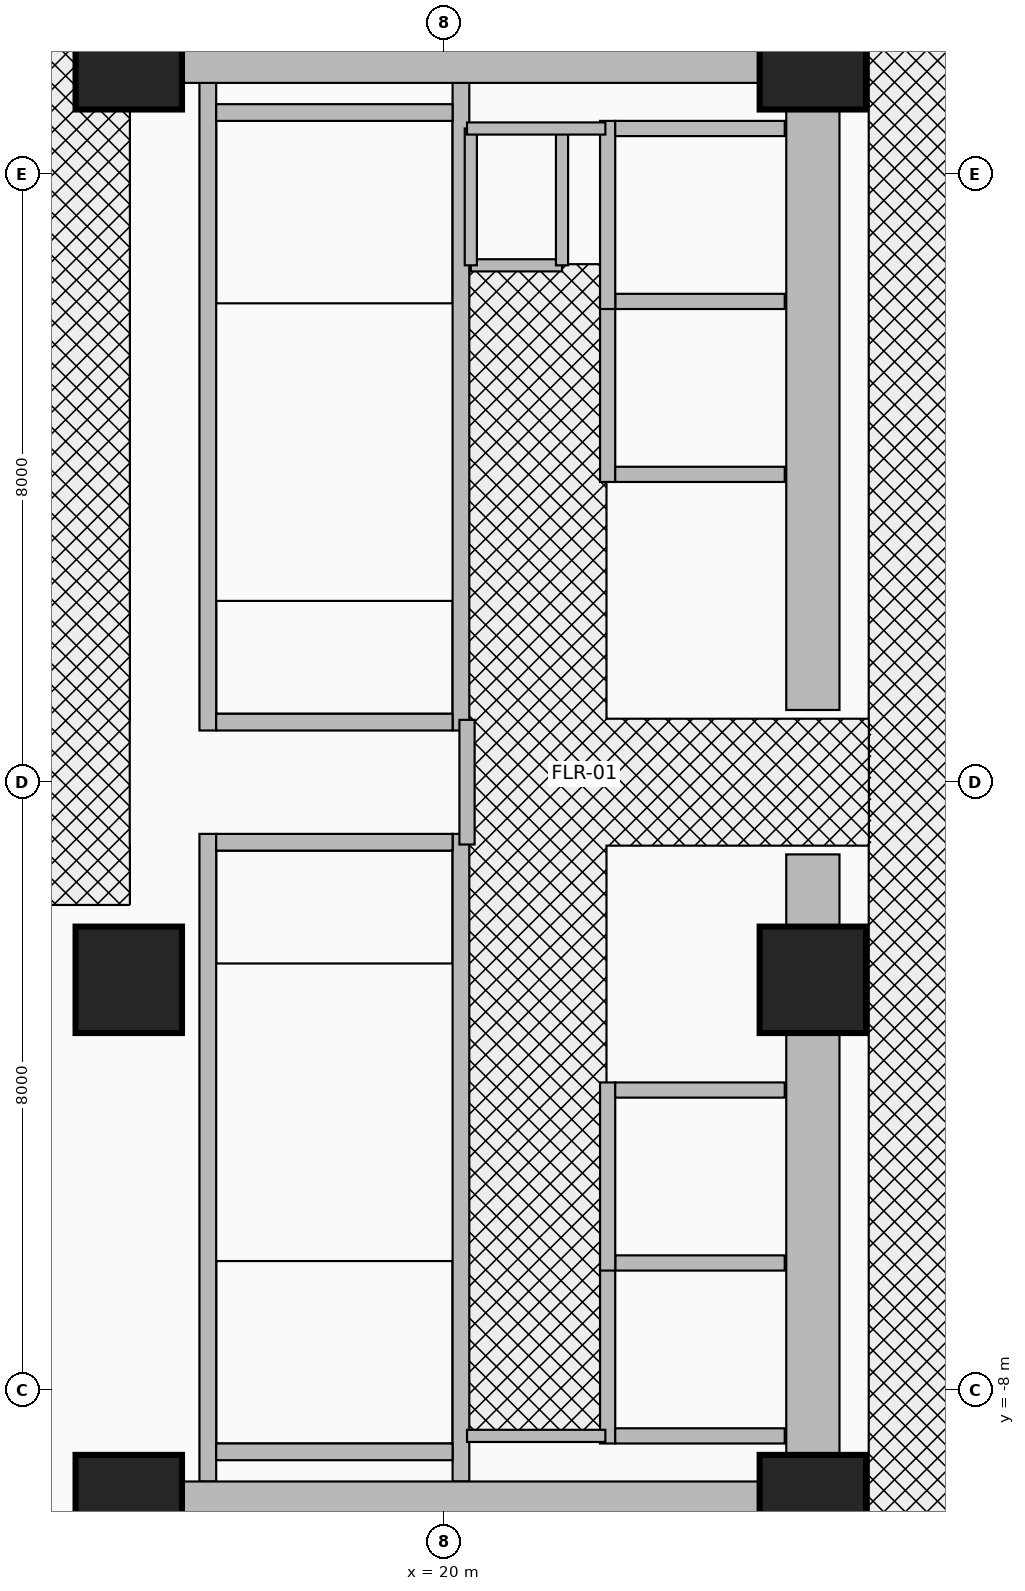
"""IFC4 building model, lengths in metres.
Left out: names, types, materials, properties, quantities, classifications, styles, units other than length and angle.
Written with IfcOpenShell. Run it as: python <this file> out.ifc"""

import sys

from ifc_helpers import new_model, si_unit, direction, frame, frame_2d, origin, origin_2d, place, context, subcontext, project, spatial, rectangle, extrude, source, transform, mapped, element, fill, save


model = new_model("IFC4")
c1 = context("Model", 3, precision=1e-05, world=origin(), true_north=direction((0.0, 1.0)))
c2 = subcontext(c1, "Body", "Model", "MODEL_VIEW")
j1 = project(units=[si_unit("LENGTHUNIT", "METRE"), si_unit("PLANEANGLEUNIT", "RADIAN")], contexts=[c1])
p1 = place(None, origin())
s1 = spatial("IfcSite", under=j1, at=p1, CompositionType="ELEMENT")
p2 = place(p1, origin())
s2 = spatial("IfcBuilding", under=s1, at=p2, CompositionType="ELEMENT")
p3 = place(p2, frame((0.0, 0.0, 10.4)))
s3 = spatial("IfcBuildingStorey", under=s2, at=p3, CompositionType="ELEMENT", Elevation=10.4)
for number, where, z_axis, x_axis in (
    (1, (16.89, 0.68, 0.0), (0.0, 0.0, 1.0), (0.0, 1.0, 0.0)),
    (2, (20.22, 0.68, 0.0), (0.0, 0.0, 1.0), (0.0, 1.0, 0.0)),
):
    element("IfcWall", number, at=place(p3, frame(where, z_axis=z_axis, x_axis=x_axis)), inside=s3, PredefinedType="SHEAR", context=c2, shape_type="SweptSolid", body=[
        extrude(rectangle(XDim=8.52, YDim=0.22, at=frame_2d((4.26, 0.0))), origin(), (0.0, 0.0, 1.0), 4.92),
    ])
p4 = place(p3, frame((17.0, 0.79, 0.0), z_axis=(0.0, 0.0, 1.0), x_axis=(1.0, 0.0, 0.0)))
e3 = element("IfcWall", 3, at=p4, inside=s3, PredefinedType="SHEAR", context=c2, shape_type="SweptSolid", body=[
    extrude(rectangle(XDim=3.11, YDim=0.22, at=frame_2d((1.555, 0.0))), origin(), (0.0, 0.0, 1.0), 4.92),
])
p5 = place(p4, frame((0.95, 0.0, 0.0)))
e4 = element("IfcOpeningElement", 4, at=p5, cuts=e3, PredefinedType="OPENING", context=c2, shape_type="SweptSolid", body=[
    extrude(rectangle(XDim=1.1, YDim=2.15, at=frame_2d((0.55, 1.075))), frame((0.0, 0.125, 0.0), z_axis=(0.0, -1.0, 0.0), x_axis=(1.0, 0.0, 0.0)), (0.0, 0.0, 1.0), 0.25),
])
p6 = place(p3, frame((17.0, 8.81, 0.0), z_axis=(0.0, 0.0, 1.0), x_axis=(1.0, 0.0, 0.0)))
e5 = element("IfcWall", 5, at=p6, inside=s3, PredefinedType="SHEAR", context=c2, shape_type="SweptSolid", body=[
    extrude(rectangle(XDim=3.11, YDim=0.22, at=frame_2d((1.555, 0.0))), origin(), (0.0, 0.0, 1.0), 4.92),
])
for number, where, z_axis, x_axis in (
    (6, (16.89, -9.2, 0.0), (0.0, 0.0, 1.0), (0.0, 1.0, 0.0)),
    (7, (20.22, -9.2, 0.0), (0.0, 0.0, 1.0), (0.0, 1.0, 0.0)),
):
    element("IfcWall", number, at=place(p3, frame(where, z_axis=z_axis, x_axis=x_axis)), inside=s3, PredefinedType="SHEAR", context=c2, shape_type="SweptSolid", body=[
        extrude(rectangle(XDim=8.52, YDim=0.22, at=frame_2d((4.26, 0.0))), origin(), (0.0, 0.0, 1.0), 4.92),
    ])
p7 = place(p3, frame((17.0, -8.81, 0.0), z_axis=(0.0, 0.0, 1.0), x_axis=(1.0, 0.0, 0.0)))
e8 = element("IfcWall", 8, at=p7, inside=s3, PredefinedType="SHEAR", context=c2, shape_type="SweptSolid", body=[
    extrude(rectangle(XDim=3.11, YDim=0.22, at=frame_2d((1.555, 0.0))), origin(), (0.0, 0.0, 1.0), 4.92),
])
p8 = place(p3, frame((17.0, -0.79, 0.0), z_axis=(0.0, 0.0, 1.0), x_axis=(1.0, 0.0, 0.0)))
e9 = element("IfcWall", 9, at=p8, inside=s3, PredefinedType="SHEAR", context=c2, shape_type="SweptSolid", body=[
    extrude(rectangle(XDim=3.11, YDim=0.22, at=frame_2d((1.555, 0.0))), origin(), (0.0, 0.0, 1.0), 4.92),
])
p9 = place(p8, frame((0.95, 0.0, 0.0)))
e10 = element("IfcOpeningElement", 10, at=p9, cuts=e9, PredefinedType="OPENING", context=c2, shape_type="SweptSolid", body=[
    extrude(rectangle(XDim=1.1, YDim=2.15, at=frame_2d((0.55, 1.075))), frame((0.0, 0.125, 0.0), z_axis=(0.0, -1.0, 0.0), x_axis=(1.0, 0.0, 0.0)), (0.0, 0.0, 1.0), 0.25),
])
for number, where, z_axis, x_axis in (
    (11, (24.85, -9.9, 0.0), (0.0, 0.0, 1.0), (0.0, 1.0, 0.0)),
    (12, (24.85, 0.95, 0.0), (0.0, 0.0, 1.0), (0.0, 1.0, 0.0)),
):
    element("IfcWall", number, at=place(p3, frame(where, z_axis=z_axis, x_axis=x_axis)), inside=s3, PredefinedType="SHEAR", context=c2, shape_type="SweptSolid", body=[
        extrude(rectangle(XDim=8.95, YDim=0.7, at=frame_2d((4.475, 0.0))), origin(), (0.0, 0.0, 1.0), 4.92),
    ])
for number, where, z_axis, x_axis in (
    (13, (15.85, 9.55, 0.0), (0.0, 0.0, 1.0), (1.0, 0.0, 0.0)),
    (14, (15.85, -9.55, 0.0), (0.0, 0.0, 1.0), (1.0, 0.0, 0.0)),
):
    element("IfcWall", number, at=place(p3, frame(where, z_axis=z_axis, x_axis=x_axis)), inside=s3, PredefinedType="SHEAR", context=c2, shape_type="SweptSolid", body=[
        extrude(rectangle(XDim=9.0, YDim=0.7, at=frame_2d((4.5, 0.0))), origin(), (0.0, 0.0, 1.0), 4.92),
    ])
m1 = source(origin(), c2, "Body", "SweptSolid", [
    extrude(rectangle(XDim=1.4, YDim=1.4, at=origin_2d()), origin(), (0.0, 0.0, 1.0), 5.2),
])
for number, where, z_axis, x_axis in (
    (15, (15.85, -9.55, 0.0), (0.0, 0.0, 1.0), (1.0, 0.0, 0.0)),
    (16, (24.85, -9.55, 0.0), (0.0, 0.0, 1.0), (1.0, 0.0, 0.0)),
    (17, (15.85, -2.6, 0.0), (0.0, 0.0, 1.0), (1.0, 0.0, 0.0)),
    (18, (24.85, -2.6, 0.0), (0.0, 0.0, 1.0), (1.0, 0.0, 0.0)),
    (19, (15.85, 9.55, 0.0), (0.0, 0.0, 1.0), (1.0, 0.0, 0.0)),
    (20, (24.85, 9.55, 0.0), (0.0, 0.0, 1.0), (1.0, 0.0, 0.0)),
):
    element("IfcColumn", number, at=place(p3, frame(where, z_axis=z_axis, x_axis=x_axis)), inside=s3, PredefinedType="COLUMN", context=c2, shape_type="MappedRepresentation", body=[
        mapped(m1, transform((0.0, 0.0, 0.0), x_axis=(1.0, 0.0, 0.0), y_axis=(0.0, 1.0, 0.0), z_axis=(0.0, 0.0, 1.0), scale=1.0)),
    ])
p10 = place(p3, frame((22.15, -8.7, 0.0), z_axis=(0.0, 0.0, 1.0), x_axis=(0.0, 1.0, 0.0)))
e21 = element("IfcWall", 21, at=p10, inside=s3, PredefinedType="MOVABLE", context=c2, shape_type="SweptSolid", body=[
    extrude(rectangle(XDim=2.475, YDim=0.2, at=frame_2d((1.237, 0.0))), origin(), (0.0, 0.0, 1.0), 4.92),
])
p11 = place(p10, frame((0.688, 0.0, 0.0)))
e22 = element("IfcOpeningElement", 22, at=p11, cuts=e21, PredefinedType="OPENING", context=c2, shape_type="SweptSolid", body=[
    extrude(rectangle(XDim=1.1, YDim=2.1, at=frame_2d((0.55, 1.05))), frame((0.0, 0.115, 0.0), z_axis=(0.0, -1.0, 0.0), x_axis=(1.0, 0.0, 0.0)), (0.0, 0.0, 1.0), 0.23),
])
for number, where, z_axis, x_axis in (
    (23, (22.25, -8.6, 0.0), (0.0, 0.0, 1.0), (1.0, 0.0, 0.0)),
    (24, (22.25, -6.325, 0.0), (0.0, 0.0, 1.0), (1.0, 0.0, 0.0)),
):
    element("IfcWall", number, at=place(p3, frame(where, z_axis=z_axis, x_axis=x_axis)), inside=s3, PredefinedType="MOVABLE", context=c2, shape_type="SweptSolid", body=[
        extrude(rectangle(XDim=2.23, YDim=0.2, at=frame_2d((1.115, 0.0))), origin(), (0.0, 0.0, 1.0), 4.92),
    ])
p12 = place(p3, frame((22.15, -6.425, 0.0), z_axis=(0.0, 0.0, 1.0), x_axis=(0.0, 1.0, 0.0)))
e25 = element("IfcWall", 25, at=p12, inside=s3, PredefinedType="MOVABLE", context=c2, shape_type="SweptSolid", body=[
    extrude(rectangle(XDim=2.475, YDim=0.2, at=frame_2d((1.238, 0.0))), origin(), (0.0, 0.0, 1.0), 4.92),
])
p13 = place(p12, frame((0.688, 0.0, 0.0)))
e26 = element("IfcOpeningElement", 26, at=p13, cuts=e25, PredefinedType="OPENING", context=c2, shape_type="SweptSolid", body=[
    extrude(rectangle(XDim=1.1, YDim=2.1, at=frame_2d((0.55, 1.05))), frame((0.0, 0.115, 0.0), z_axis=(0.0, -1.0, 0.0), x_axis=(1.0, 0.0, 0.0)), (0.0, 0.0, 1.0), 0.23),
])
p14 = place(p3, frame((22.25, -4.05, 0.0), z_axis=(0.0, 0.0, 1.0), x_axis=(1.0, 0.0, 0.0)))
e27 = element("IfcWall", 27, at=p14, inside=s3, PredefinedType="MOVABLE", context=c2, shape_type="SweptSolid", body=[
    extrude(rectangle(XDim=2.23, YDim=0.2, at=frame_2d((1.115, 0.0))), origin(), (0.0, 0.0, 1.0), 4.92),
])
p15 = place(p3, frame((22.15, 3.95, 0.0), z_axis=(0.0, 0.0, 1.0), x_axis=(0.0, 1.0, 0.0)))
e28 = element("IfcWall", 28, at=p15, inside=s3, PredefinedType="MOVABLE", context=c2, shape_type="SweptSolid", body=[
    extrude(rectangle(XDim=2.475, YDim=0.2, at=frame_2d((1.238, 0.0))), origin(), (0.0, 0.0, 1.0), 4.92),
])
for number, where, z_axis, x_axis in (
    (29, (22.25, 4.05, 0.0), (0.0, 0.0, 1.0), (1.0, 0.0, 0.0)),
    (30, (22.25, 6.325, 0.0), (0.0, 0.0, 1.0), (1.0, 0.0, 0.0)),
):
    element("IfcWall", number, at=place(p3, frame(where, z_axis=z_axis, x_axis=x_axis)), inside=s3, PredefinedType="MOVABLE", context=c2, shape_type="SweptSolid", body=[
        extrude(rectangle(XDim=2.23, YDim=0.2, at=frame_2d((1.115, 0.0))), origin(), (0.0, 0.0, 1.0), 3.745),
    ])
p16 = place(p3, frame((22.15, 6.225, 0.0), z_axis=(0.0, 0.0, 1.0), x_axis=(0.0, 1.0, 0.0)))
e31 = element("IfcWall", 31, at=p16, inside=s3, PredefinedType="MOVABLE", context=c2, shape_type="SweptSolid", body=[
    extrude(rectangle(XDim=2.475, YDim=0.2, at=frame_2d((1.237, 0.0))), origin(), (0.0, 0.0, 1.0), 4.92),
])
p17 = place(p3, frame((22.25, 8.6, 0.0), z_axis=(0.0, 0.0, 1.0), x_axis=(1.0, 0.0, 0.0)))
e32 = element("IfcWall", 32, at=p17, inside=s3, PredefinedType="MOVABLE", context=c2, shape_type="SweptSolid", body=[
    extrude(rectangle(XDim=2.23, YDim=0.2, at=frame_2d((1.115, 0.0))), origin(), (0.0, 0.0, 1.0), 3.745),
])
p18 = place(p3, frame((20.3, -0.82, 0.0), z_axis=(0.0, 0.0, 1.0), x_axis=(0.0, 1.0, 0.0)))
e33 = element("IfcWall", 33, at=p18, inside=s3, PredefinedType="PARTITIONING", context=c2, shape_type="SweptSolid", body=[
    extrude(rectangle(XDim=1.64, YDim=0.2, at=frame_2d((0.82, 0.0))), origin(), (0.0, 0.0, 1.0), 4.92),
])
p19 = place(p18, frame((0.295, 0.0, 0.0)))
e34 = element("IfcOpeningElement", 34, at=p19, cuts=e33, PredefinedType="OPENING", context=c2, shape_type="SweptSolid", body=[
    extrude(rectangle(XDim=1.05, YDim=2.15, at=frame_2d((0.525, 1.075))), frame((0.0, 0.115, 0.0), z_axis=(0.0, -1.0, 0.0), x_axis=(1.0, 0.0, 0.0)), (0.0, 0.0, 1.0), 0.23),
])
p20 = place(p3, frame((20.35, 6.8, 0.0), z_axis=(0.0, 0.0, 1.0), x_axis=(1.0, 0.0, 0.0)))
e35 = element("IfcWall", 35, at=p20, inside=s3, PredefinedType="PARTITIONING", context=c2, shape_type="SweptSolid", body=[
    extrude(rectangle(XDim=1.2, YDim=0.16, at=frame_2d((0.6, 0.0))), origin(), (0.0, 0.0, 1.0), 4.92),
])
p21 = place(p20, frame((0.175, 0.0, 0.0)))
e36 = element("IfcOpeningElement", 36, at=p21, cuts=e35, PredefinedType="OPENING", context=c2, shape_type="SweptSolid", body=[
    extrude(rectangle(XDim=0.85, YDim=2.05, at=frame_2d((0.425, 1.025))), frame((0.0, 0.095, 0.0), z_axis=(0.0, -1.0, 0.0), x_axis=(1.0, 0.0, 0.0)), (0.0, 0.0, 1.0), 0.19),
])
for number, where, z_axis, x_axis in (
    (37, (21.55, 6.8, 0.0), (0.0, 0.0, 1.0), (0.0, 1.0, 0.0)),
    (38, (20.35, 6.8, 0.0), (0.0, 0.0, 1.0), (0.0, 1.0, 0.0)),
):
    element("IfcWall", number, at=place(p3, frame(where, z_axis=z_axis, x_axis=x_axis)), inside=s3, PredefinedType="PARTITIONING", context=c2, shape_type="SweptSolid", body=[
        extrude(rectangle(XDim=1.8, YDim=0.16, at=frame_2d((0.9, 0.0))), origin(), (0.0, 0.0, 1.0), 4.92),
    ])
for number, where, z_axis, x_axis in (
    (39, (20.3, -8.6, 0.0), (0.0, 0.0, 1.0), (1.0, 0.0, 0.0)),
    (40, (20.3, 8.6, 0.0), (0.0, 0.0, 1.0), (1.0, 0.0, 0.0)),
):
    element("IfcWall", number, at=place(p3, frame(where, z_axis=z_axis, x_axis=x_axis)), inside=s3, PredefinedType="PARTITIONING", context=c2, shape_type="SweptSolid", body=[
        extrude(rectangle(XDim=1.82, YDim=0.16, at=frame_2d((0.91, 0.0))), origin(), (0.0, 0.0, 1.0), 4.92),
    ])
p22 = place(p11, origin())
e41 = element("IfcDoor", 41, at=p22, inside=s3, OperationType="DOUBLE_DOOR_SLIDING", PredefinedType="DOOR", context=c2, shape_type="SweptSolid", body=[
    extrude(rectangle(XDim=1.1, YDim=2.1, at=frame_2d((0.55, 1.05))), frame((0.0, 0.025, 0.0), z_axis=(0.0, -1.0, 0.0), x_axis=(1.0, 0.0, 0.0)), (0.0, 0.0, 1.0), 0.05),
])
fill(e22, e41)
p23 = place(p13, origin())
e42 = element("IfcDoor", 42, at=p23, inside=s3, OperationType="DOUBLE_DOOR_SLIDING", PredefinedType="DOOR", context=c2, shape_type="SweptSolid", body=[
    extrude(rectangle(XDim=1.1, YDim=2.1, at=frame_2d((0.55, 1.05))), frame((0.0, 0.025, 0.0), z_axis=(0.0, -1.0, 0.0), x_axis=(1.0, 0.0, 0.0)), (0.0, 0.0, 1.0), 0.05),
])
fill(e26, e42)
p24 = place(p19, origin())
e43 = element("IfcDoor", 43, at=p24, inside=s3, OperationType="SINGLE_SWING_RIGHT", PredefinedType="DOOR", context=c2, shape_type="SweptSolid", body=[
    extrude(rectangle(XDim=1.05, YDim=2.15, at=frame_2d((0.525, 1.075))), frame((0.0, 0.025, 0.0), z_axis=(0.0, -1.0, 0.0), x_axis=(1.0, 0.0, 0.0)), (0.0, 0.0, 1.0), 0.05),
])
fill(e34, e43)
p25 = place(p5, frame((1.1, 0.0, 0.0), z_axis=(0.0, 0.0, 1.0), x_axis=(-1.0, 0.0, 0.0)))
e44 = element("IfcDoor", 44, at=p25, inside=s3, OperationType="SINGLE_SWING_LEFT", PredefinedType="DOOR", context=c2, shape_type="SweptSolid", body=[
    extrude(rectangle(XDim=1.1, YDim=2.15, at=frame_2d((0.55, 1.075))), frame((0.0, 0.025, 0.0), z_axis=(0.0, -1.0, 0.0), x_axis=(1.0, 0.0, 0.0)), (0.0, 0.0, 1.0), 0.05),
])
fill(e4, e44)
p26 = place(p9, origin())
e45 = element("IfcDoor", 45, at=p26, inside=s3, OperationType="SINGLE_SWING_RIGHT", PredefinedType="DOOR", context=c2, shape_type="SweptSolid", body=[
    extrude(rectangle(XDim=1.1, YDim=2.15, at=frame_2d((0.55, 1.075))), frame((0.0, 0.025, 0.0), z_axis=(0.0, -1.0, 0.0), x_axis=(1.0, 0.0, 0.0)), (0.0, 0.0, 1.0), 0.05),
])
fill(e10, e45)
p27 = place(p21, origin())
e46 = element("IfcDoor", 46, at=p27, inside=s3, OperationType="SINGLE_SWING_LEFT", PredefinedType="DOOR", context=c2, shape_type="SweptSolid", body=[
    extrude(rectangle(XDim=0.85, YDim=2.05, at=frame_2d((0.425, 1.025))), frame((0.0, 0.025, 0.0), z_axis=(0.0, -1.0, 0.0), x_axis=(1.0, 0.0, 0.0)), (0.0, 0.0, 1.0), 0.05),
])
fill(e36, e46)
save(model, sys.argv[1])
